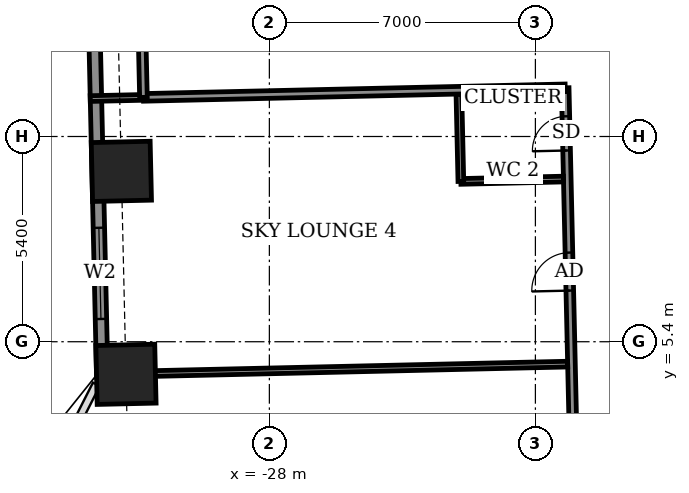
"""IFC4 building model, lengths in metres.
Left out: names, types, materials, properties, quantities, classifications, styles, units other than length and angle.
Written with IfcOpenShell. Run it as: python <this file> out.ifc"""

import sys

from ifc_helpers import new_model, si_unit, direction, frame, frame_2d, origin, origin_2d, place, context, subcontext, project, spatial, rectangle, extrude, element, fill, save


model = new_model("IFC4")
c1 = context("Model", 3, precision=1e-05, world=origin(), true_north=direction((0.0, 1.0)))
c2 = subcontext(c1, "Body", "Model", "MODEL_VIEW")
j1 = project(units=[si_unit("LENGTHUNIT", "METRE"), si_unit("PLANEANGLEUNIT", "RADIAN")], contexts=[c1])
p1 = place(None, origin())
s1 = spatial("IfcSite", under=j1, at=p1, CompositionType="ELEMENT")
p2 = place(p1, origin())
s2 = spatial("IfcBuilding", under=s1, at=p2, CompositionType="ELEMENT")
p3 = place(p2, frame((0.0, 0.0, 29.5)))
s3 = spatial("IfcBuildingStorey", under=s2, at=p3, CompositionType="ELEMENT", Elevation=29.5)
for number, where, z_axis, x_axis in (
    (1, (-31.894, 9.883, -0.55), (0.0, 0.0, 1.0), (0.023, -1.0, 0.0)),
    (2, (-31.773, 4.542, -0.55), (0.0, 0.0, 1.0), (0.023, -1.0, 0.0)),
):
    element("IfcColumn", number, at=place(p3, frame(where, z_axis=z_axis, x_axis=x_axis)), inside=s3, PredefinedType="COLUMN", context=c2, shape_type="SweptSolid", body=[
        extrude(rectangle(XDim=1.55, YDim=1.55, at=origin_2d()), origin(), (0.0, 0.0, 1.0), 4.6),
    ])
p4 = place(p3, frame((-32.758, 20.399, 0.0), z_axis=(0.0, 0.0, 1.0), x_axis=(0.022668485183, -0.999743036875, 0.0)))
e3 = element("IfcWall", 3, at=p4, inside=s3, PredefinedType="SOLIDWALL", context=c2, shape_type="SweptSolid", body=[
    extrude(rectangle(XDim=15.929, YDim=0.3, at=frame_2d((7.964, 0.0))), origin(), (0.0, 0.0, 1.0), 4.05),
])
p5 = place(p4, frame((2.183, 0.0, 0.0)))
e4 = element("IfcOpeningElement", 4, at=p5, cuts=e3, PredefinedType="OPENING", context=c2, shape_type="SweptSolid", body=[
    extrude(rectangle(XDim=1.5, YDim=2.4, at=frame_2d((0.75, 1.2))), frame((0.0, 0.16, 0.0), z_axis=(0.0, -1.0, 0.0), x_axis=(1.0, 0.0, 0.0)), (0.0, 0.0, 1.0), 0.32),
])
p6 = place(p4, frame((12.004, 0.0, 0.9)))
e5 = element("IfcOpeningElement", 5, at=p6, cuts=e3, PredefinedType="OPENING", context=c2, shape_type="SweptSolid", body=[
    extrude(rectangle(XDim=2.4, YDim=1.5, at=frame_2d((1.2, 0.75))), frame((0.0, 0.16, 0.0), z_axis=(0.0, -1.0, 0.0), x_axis=(1.0, 0.0, 0.0)), (0.0, 0.0, 1.0), 0.32),
])
p7 = place(p3, frame((-33.918, 7.62, 0.0), z_axis=(0.0, 0.0, 1.0), x_axis=(-0.022666865795, 0.999743073592, 0.0)))
e6 = element("IfcWall", 6, at=p7, inside=s3, PredefinedType="USERDEFINED", context=c2, shape_type="SweptSolid", body=[
    extrude(rectangle(XDim=5.999, YDim=0.55, at=frame_2d((3.0, 0.0))), origin(), (0.0, 0.0, 1.0), 0.8),
])
p8 = place(p3, frame((-19.589, -15.562, 0.0), z_axis=(0.0, 0.0, 1.0), x_axis=(-0.02267447203, 0.999742901109, 0.0)))
e7 = element("IfcWall", 7, at=p8, inside=s3, PredefinedType="PARTITIONING", context=c2, shape_type="SweptSolid", body=[
    extrude(rectangle(XDim=27.65, YDim=0.2, at=frame_2d((13.825, 0.0))), origin(), (0.0, 0.0, 1.0), 4.05),
])
p9 = place(p8, frame((22.313, 0.0, 0.0)))
e8 = element("IfcOpeningElement", 8, at=p9, cuts=e7, PredefinedType="OPENING", context=c2, shape_type="SweptSolid", body=[
    extrude(rectangle(XDim=1.0, YDim=2.1, at=frame_2d((0.5, 1.05))), frame((0.0, 0.11, 0.0), z_axis=(0.0, -1.0, 0.0), x_axis=(1.0, 0.0, 0.0)), (0.0, 0.0, 1.0), 0.22),
])
p10 = place(p8, frame((26.0, 0.0, 0.0)))
e9 = element("IfcOpeningElement", 9, at=p10, cuts=e7, PredefinedType="OPENING", context=c2, shape_type="SweptSolid", body=[
    extrude(rectangle(XDim=0.9, YDim=2.1, at=frame_2d((0.45, 1.05))), frame((0.0, 0.11, 0.0), z_axis=(0.0, -1.0, 0.0), x_axis=(1.0, 0.0, 0.0)), (0.0, 0.0, 1.0), 0.22),
])
p11 = place(p8, frame((17.817, 0.0, 0.0)))
e10 = element("IfcOpeningElement", 10, at=p11, cuts=e7, PredefinedType="OPENING", context=c2, shape_type="SweptSolid", body=[
    extrude(rectangle(XDim=1.0, YDim=2.1, at=frame_2d((0.5, 1.05))), frame((0.0, 0.11, 0.0), z_axis=(0.0, -1.0, 0.0), x_axis=(1.0, 0.0, 0.0)), (0.0, 0.0, 1.0), 0.22),
])
p12 = place(p8, frame((12.1, 0.0, 0.0)))
e11 = element("IfcOpeningElement", 11, at=p12, cuts=e7, PredefinedType="OPENING", context=c2, shape_type="SweptSolid", body=[
    extrude(rectangle(XDim=1.0, YDim=2.1, at=frame_2d((0.5, 1.05))), frame((0.0, 0.11, 0.0), z_axis=(0.0, -1.0, 0.0), x_axis=(1.0, 0.0, 0.0)), (0.0, 0.0, 1.0), 0.22),
])
p13 = place(p8, frame((14.625, 0.0, 0.0)))
e12 = element("IfcOpeningElement", 12, at=p13, cuts=e7, PredefinedType="OPENING", context=c2, shape_type="SweptSolid", body=[
    extrude(rectangle(XDim=0.9, YDim=2.1, at=frame_2d((0.45, 1.05))), frame((0.0, 0.11, 0.0), z_axis=(0.0, -1.0, 0.0), x_axis=(1.0, 0.0, 0.0)), (0.0, 0.0, 1.0), 0.22),
])
p14 = place(p8, frame((9.825, 0.0, 0.0)))
e13 = element("IfcOpeningElement", 13, at=p14, cuts=e7, PredefinedType="OPENING", context=c2, shape_type="SweptSolid", body=[
    extrude(rectangle(XDim=1.0, YDim=2.1, at=frame_2d((0.5, 1.05))), frame((0.0, 0.11, 0.0), z_axis=(0.0, -1.0, 0.0), x_axis=(1.0, 0.0, 0.0)), (0.0, 0.0, 1.0), 0.22),
])
p15 = place(p8, frame((7.475, 0.0, 0.0)))
e14 = element("IfcOpeningElement", 14, at=p15, cuts=e7, PredefinedType="OPENING", context=c2, shape_type="SweptSolid", body=[
    extrude(rectangle(XDim=0.9, YDim=2.1, at=frame_2d((0.45, 1.05))), frame((0.0, 0.11, 0.0), z_axis=(0.0, -1.0, 0.0), x_axis=(1.0, 0.0, 0.0)), (0.0, 0.0, 1.0), 0.22),
])
p16 = place(p8, frame((1.612, 0.0, 0.0)))
e15 = element("IfcOpeningElement", 15, at=p16, cuts=e7, PredefinedType="OPENING", context=c2, shape_type="SweptSolid", body=[
    extrude(rectangle(XDim=1.0, YDim=2.1, at=frame_2d((0.5, 1.05))), frame((0.0, 0.11, 0.0), z_axis=(0.0, -1.0, 0.0), x_axis=(1.0, 0.0, 0.0)), (0.0, 0.0, 1.0), 0.22),
])
p17 = place(p8, frame((4.975, 0.0, 0.0)))
e16 = element("IfcOpeningElement", 16, at=p17, cuts=e7, PredefinedType="OPENING", context=c2, shape_type="SweptSolid", body=[
    extrude(rectangle(XDim=0.9, YDim=2.1, at=frame_2d((0.45, 1.05))), frame((0.0, 0.11, 0.0), z_axis=(0.0, -1.0, 0.0), x_axis=(1.0, 0.0, 0.0)), (0.0, 0.0, 1.0), 0.22),
])
p18 = place(p3, frame((-32.248, 4.536, 0.0), z_axis=(0.0, 0.0, 1.0), x_axis=(0.999741439573, 0.022738821441, 0.0)))
e17 = element("IfcWall", 17, at=p18, inside=s3, PredefinedType="PARTITIONING", context=c2, shape_type="SweptSolid", body=[
    extrude(rectangle(XDim=12.1, YDim=0.15, at=frame_2d((6.05, 0.0))), origin(), (0.0, 0.0, 1.0), 4.05),
])
p19 = place(p3, frame((-22.961, 9.618, 0.0), z_axis=(0.0, 0.0, 1.0), x_axis=(0.999736155505, 0.022969966847, 0.0)))
e18 = element("IfcWall", 18, at=p19, inside=s3, PredefinedType="PARTITIONING", context=c2, shape_type="SweptSolid", body=[
    extrude(rectangle(XDim=2.7, YDim=0.15, at=frame_2d((1.35, 0.0))), origin(), (0.0, 0.0, 1.0), 4.05),
])
p20 = place(p3, frame((-22.961, 9.618, 0.0), z_axis=(0.0, 0.0, 1.0), x_axis=(-0.022603288534, 0.999744513037, 0.0)))
e19 = element("IfcWall", 19, at=p20, inside=s3, PredefinedType="PARTITIONING", context=c2, shape_type="SweptSolid", body=[
    extrude(rectangle(XDim=2.301, YDim=0.15, at=frame_2d((1.15, 0.0))), origin(), (0.0, 0.0, 1.0), 4.05),
])
p21 = place(p3, frame((-32.713, 11.798, 0.0), z_axis=(0.0, 0.0, 1.0), x_axis=(0.999756172383, 0.022081571112, 0.0)))
e20 = element("IfcWall", 20, at=p21, inside=s3, PredefinedType="PARTITIONING", context=c2, shape_type="SweptSolid", body=[
    extrude(rectangle(XDim=1.404, YDim=0.15, at=frame_2d((0.702, 0.0))), origin(), (0.0, 0.0, 1.0), 3.55),
])
p22 = place(p3, frame((-31.313, 11.829, 0.0), z_axis=(0.0, 0.0, 1.0), x_axis=(0.999742346277, 0.022698921993, 0.0)))
e21 = element("IfcWall", 21, at=p22, inside=s3, PredefinedType="PARTITIONING", context=c2, shape_type="SweptSolid", body=[
    extrude(rectangle(XDim=11.1, YDim=0.2, at=frame_2d((5.55, 0.0))), origin(), (0.0, 0.0, 1.0), 4.05),
])
p23 = place(p3, frame((-31.313, 11.829, 0.0), z_axis=(0.0, 0.0, 1.0), x_axis=(-0.022617910375, 0.999744182344, 0.0)))
e22 = element("IfcWall", 22, at=p23, inside=s3, PredefinedType="PARTITIONING", context=c2, shape_type="SweptSolid", body=[
    extrude(rectangle(XDim=1.5, YDim=0.2, at=frame_2d((0.75, 0.0))), origin(), (0.0, 0.0, 1.0), 4.05),
])
p24 = place(p6, origin())
e23 = element("IfcWindow", 23, at=p24, inside=s3, PartitioningType="DOUBLE_PANEL_VERTICAL", PredefinedType="WINDOW", context=c2, shape_type="SweptSolid", body=[
    extrude(rectangle(XDim=2.4, YDim=1.5, at=frame_2d((1.2, 0.75))), frame((0.0, 0.03, 0.0), z_axis=(0.0, -1.0, 0.0), x_axis=(1.0, 0.0, 0.0)), (0.0, 0.0, 1.0), 0.06),
])
fill(e5, e23)
p25 = place(p9, origin())
e24 = element("IfcDoor", 24, at=p25, inside=s3, OperationType="SINGLE_SWING_LEFT", PredefinedType="DOOR", context=c2, shape_type="SweptSolid", body=[
    extrude(rectangle(XDim=1.0, YDim=2.1, at=frame_2d((0.5, 1.05))), frame((0.0, 0.025, 0.0), z_axis=(0.0, -1.0, 0.0), x_axis=(1.0, 0.0, 0.0)), (0.0, 0.0, 1.0), 0.05),
])
fill(e8, e24)
p26 = place(p10, origin())
e25 = element("IfcDoor", 25, at=p26, inside=s3, OperationType="SINGLE_SWING_LEFT", PredefinedType="DOOR", context=c2, shape_type="SweptSolid", body=[
    extrude(rectangle(XDim=0.9, YDim=2.1, at=frame_2d((0.45, 1.05))), frame((0.0, 0.025, 0.0), z_axis=(0.0, -1.0, 0.0), x_axis=(1.0, 0.0, 0.0)), (0.0, 0.0, 1.0), 0.05),
])
fill(e9, e25)
save(model, sys.argv[1])
